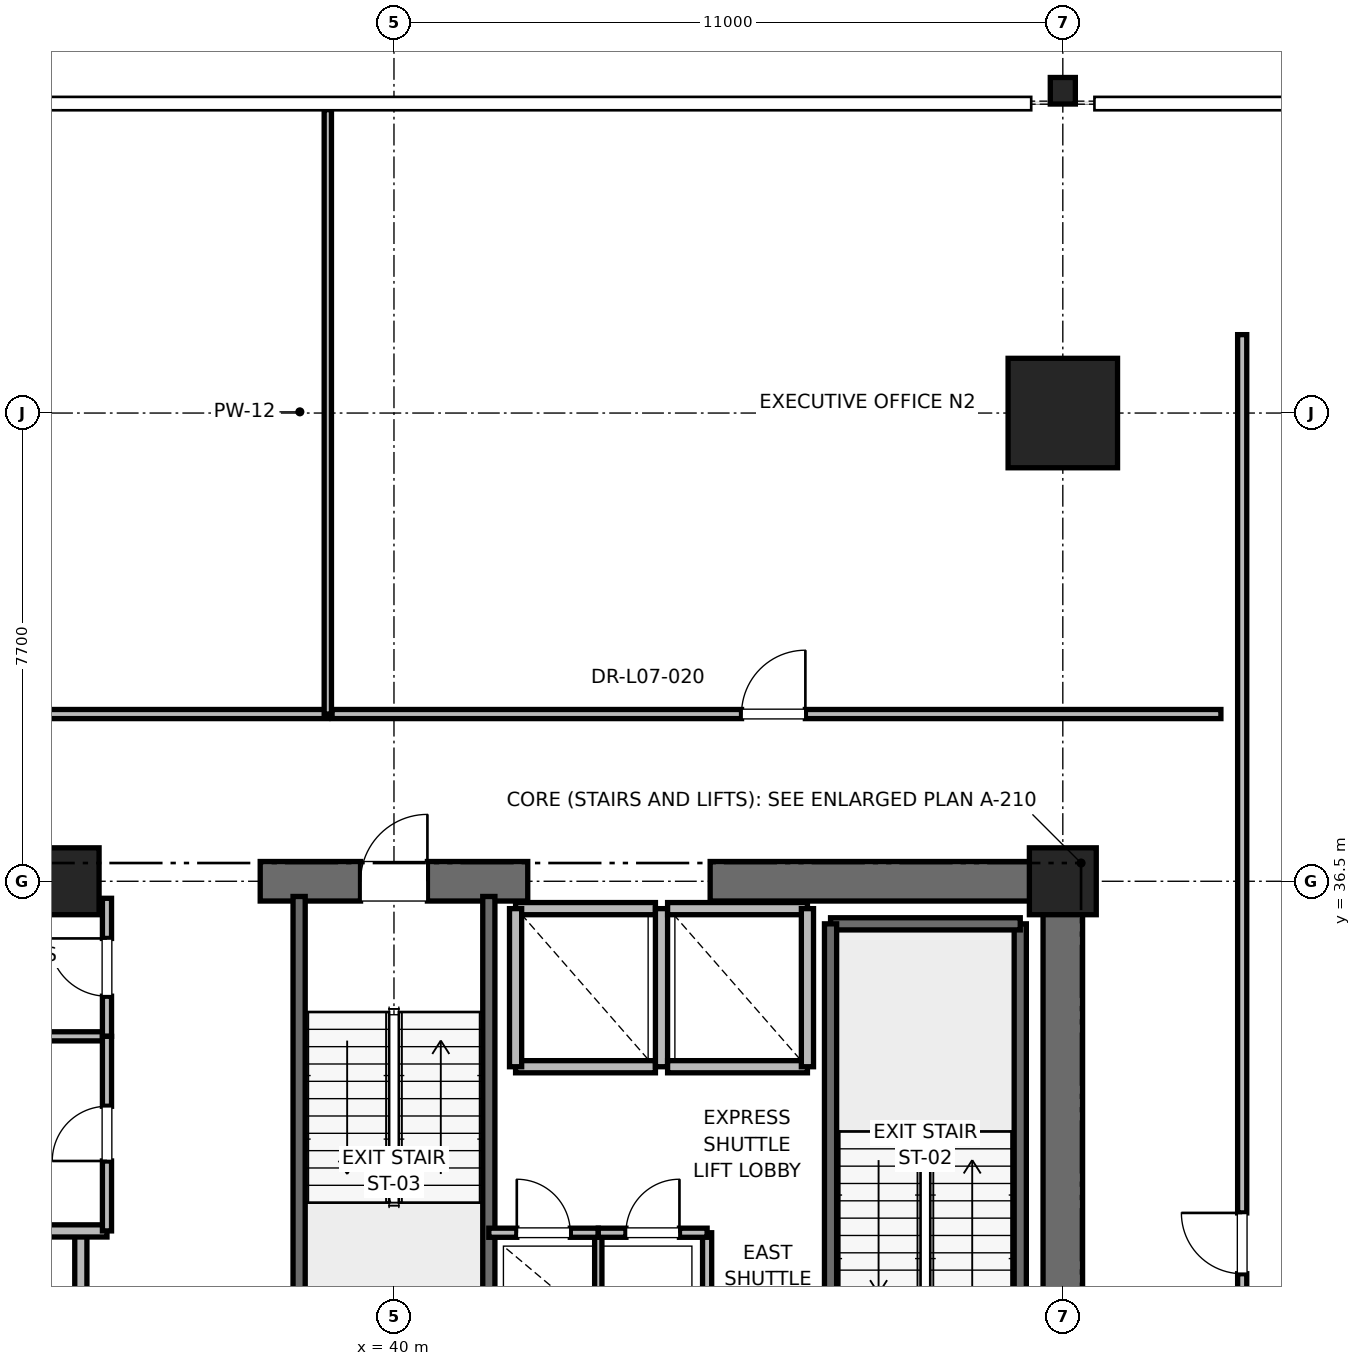
"""IFC4 building model, lengths in metres.
Left out: names, types, materials, properties, quantities, classifications, styles, units other than length and angle.
Written with IfcOpenShell. Run it as: python <this file> out.ifc"""

import sys

from ifc_helpers import new_model, si_unit, direction, frame, frame_2d, origin, origin_2d, place, context, subcontext, project, spatial, rectangle, i_section, extrude, element, fill, save


model = new_model("IFC4")
c1 = context("Model", 3, precision=1e-05, world=origin(), true_north=direction((0.0, 1.0)))
c2 = subcontext(c1, "Body", "Model", "MODEL_VIEW")
j1 = project(units=[si_unit("LENGTHUNIT", "METRE"), si_unit("PLANEANGLEUNIT", "RADIAN")], contexts=[c1])
p1 = place(None, origin())
s1 = spatial("IfcSite", under=j1, at=p1, CompositionType="ELEMENT")
p2 = place(p1, origin())
s2 = spatial("IfcBuilding", under=s1, at=p2, CompositionType="ELEMENT")
p3 = place(p2, frame((0.0, 0.0, 35.6)))
s3 = spatial("IfcBuildingStorey", under=s2, at=p3, CompositionType="ELEMENT", Elevation=35.6)
p4 = place(p3, frame((51.0, 44.2, 0.0), z_axis=(0.0, 0.0, 1.0), x_axis=(1.0, 0.0, 0.0)))
e1 = element("IfcColumn", 1, at=p4, inside=s3, PredefinedType="COLUMN", context=c2, shape_type="SweptSolid", body=[
    extrude(rectangle(XDim=1.8, YDim=1.8, at=origin_2d()), origin(), (0.0, 0.0, 1.0), 4.0),
])
p5 = place(p3, frame((51.0, 49.5, 0.0), z_axis=(0.0, 0.0, 1.0), x_axis=(1.0, 0.0, 0.0)))
e2 = element("IfcColumn", 2, at=p5, inside=s3, PredefinedType="COLUMN", context=c2, shape_type="SweptSolid", body=[
    extrude(i_section(OverallWidth=0.412, OverallDepth=0.437, WebThickness=0.036, FlangeThickness=0.058, FilletRadius=0.015, at=origin_2d()), origin(), (0.0, 0.0, 1.0), 4.0),
])
for number, where, z_axis, x_axis in (
    (3, (51.0, 36.5, 0.0), (0.0, 0.0, 1.0), (1.0, 0.0, 0.0)),
    (4, (34.6, 36.5, 0.0), (0.0, 0.0, 1.0), (1.0, 0.0, 0.0)),
):
    element("IfcColumn", number, at=place(p3, frame(where, z_axis=z_axis, x_axis=x_axis)), inside=s3, PredefinedType="PILASTER", context=c2, shape_type="SweptSolid", body=[
        extrude(rectangle(XDim=1.1, YDim=1.1, at=origin_2d()), origin(), (0.0, 0.0, 1.0), 4.0),
    ])
p6 = place(p3, frame((29.0, 36.5, 0.0), z_axis=(0.0, 0.0, 1.0), x_axis=(1.0, 0.0, 0.0)))
e5 = element("IfcWall", 5, at=p6, inside=s3, PredefinedType="SHEAR", context=c2, shape_type="SweptSolid", body=[
    extrude(rectangle(XDim=5.8, YDim=0.65, at=frame_2d((2.9, 0.0))), origin(), (0.0, 0.0, 1.0), 3.76),
])
p7 = place(p3, frame((37.8, 36.5, 0.0), z_axis=(0.0, 0.0, 1.0), x_axis=(1.0, 0.0, 0.0)))
e6 = element("IfcWall", 6, at=p7, inside=s3, PredefinedType="SHEAR", context=c2, shape_type="SweptSolid", body=[
    extrude(rectangle(XDim=4.4, YDim=0.65, at=frame_2d((2.2, 0.0))), origin(), (0.0, 0.0, 1.0), 3.76),
])
p8 = place(p7, frame((1.65, 0.0, 0.0)))
e7 = element("IfcOpeningElement", 7, at=p8, cuts=e6, PredefinedType="OPENING", context=c2, shape_type="SweptSolid", body=[
    extrude(rectangle(XDim=1.1, YDim=2.15, at=frame_2d((0.55, 1.075))), frame((0.0, 0.325, 0.0), z_axis=(0.0, -1.0, 0.0), x_axis=(1.0, 0.0, 0.0)), (0.0, 0.0, 1.0), 0.65),
])
p9 = place(p3, frame((45.2, 36.5, 0.0), z_axis=(0.0, 0.0, 1.0), x_axis=(1.0, 0.0, 0.0)))
e8 = element("IfcWall", 8, at=p9, inside=s3, PredefinedType="SHEAR", context=c2, shape_type="SweptSolid", body=[
    extrude(rectangle(XDim=5.8, YDim=0.65, at=frame_2d((2.9, 0.0))), origin(), (0.0, 0.0, 1.0), 3.76),
])
p10 = place(p3, frame((51.0, 27.7, 0.0), z_axis=(0.0, 0.0, 1.0), x_axis=(0.0, 1.0, 0.0)))
e9 = element("IfcWall", 9, at=p10, inside=s3, PredefinedType="SHEAR", context=c2, shape_type="SweptSolid", body=[
    extrude(rectangle(XDim=8.8, YDim=0.65, at=frame_2d((4.4, 0.0))), origin(), (0.0, 0.0, 1.0), 3.76),
])
p11 = place(p3, frame((50.3, 27.65, 0.0), z_axis=(0.0, 0.0, 1.0), x_axis=(0.0, 1.0, 0.0)))
e10 = element("IfcWall", 10, at=p11, inside=s3, PredefinedType="SOLIDWALL", context=c2, shape_type="SweptSolid", body=[
    extrude(rectangle(XDim=8.15, YDim=0.2, at=frame_2d((4.075, 0.0))), origin(), (0.0, 0.0, 1.0), 3.76),
])
p12 = place(p3, frame((47.18, 35.8, 0.0), z_axis=(0.0, 0.0, 1.0), x_axis=(1.0, 0.0, 0.0)))
e11 = element("IfcWall", 11, at=p12, inside=s3, PredefinedType="SOLIDWALL", context=c2, shape_type="SweptSolid", body=[
    extrude(rectangle(XDim=3.12, YDim=0.2, at=frame_2d((1.56, 0.0))), origin(), (0.0, 0.0, 1.0), 3.76),
])
p13 = place(p3, frame((47.18, 27.62, 0.0), z_axis=(0.0, 0.0, 1.0), x_axis=(0.0, 1.0, 0.0)))
e12 = element("IfcWall", 12, at=p13, inside=s3, PredefinedType="SOLIDWALL", context=c2, shape_type="SweptSolid", body=[
    extrude(rectangle(XDim=8.18, YDim=0.2, at=frame_2d((4.09, 0.0))), origin(), (0.0, 0.0, 1.0), 3.76),
])
p14 = place(p3, frame((38.44, 27.38, 0.0), z_axis=(0.0, 0.0, 1.0), x_axis=(0.0, 1.0, 0.0)))
e13 = element("IfcWall", 13, at=p14, inside=s3, PredefinedType="SOLIDWALL", context=c2, shape_type="SweptSolid", body=[
    extrude(rectangle(XDim=8.87, YDim=0.2, at=frame_2d((4.435, 0.0))), origin(), (0.0, 0.0, 1.0), 3.76),
])
p15 = place(p3, frame((41.56, 27.68, 0.0), z_axis=(0.0, 0.0, 1.0), x_axis=(0.0, 1.0, 0.0)))
e14 = element("IfcWall", 14, at=p15, inside=s3, PredefinedType="SOLIDWALL", context=c2, shape_type="SweptSolid", body=[
    extrude(rectangle(XDim=8.57, YDim=0.2, at=frame_2d((4.285, 0.0))), origin(), (0.0, 0.0, 1.0), 3.76),
])
p16 = place(p3, frame((34.85, 27.38, 0.0), z_axis=(0.0, 0.0, 1.0), x_axis=(0.0, 1.0, 0.0)))
e15 = element("IfcWall", 15, at=p16, inside=s3, PredefinedType="PARTITIONING", context=c2, shape_type="SweptSolid", body=[
    extrude(rectangle(XDim=3.37, YDim=0.2, at=frame_2d((1.685, 0.0))), origin(), (0.0, 0.0, 1.0), 3.76),
])
p17 = place(p16, frame((1.11, 0.0, 0.0)))
e16 = element("IfcOpeningElement", 16, at=p17, cuts=e15, PredefinedType="OPENING", context=c2, shape_type="SweptSolid", body=[
    extrude(rectangle(XDim=1.15, YDim=2.2, at=frame_2d((0.575, 1.1))), frame((0.0, 0.1, 0.0), z_axis=(0.0, -1.0, 0.0), x_axis=(1.0, 0.0, 0.0)), (0.0, 0.0, 1.0), 0.2),
])
p18 = place(p3, frame((32.15, 30.75, 0.0), z_axis=(0.0, 0.0, 1.0), x_axis=(1.0, 0.0, 0.0)))
e17 = element("IfcWall", 17, at=p18, inside=s3, PredefinedType="PARTITIONING", context=c2, shape_type="SweptSolid", body=[
    extrude(rectangle(XDim=3.13, YDim=0.2, at=frame_2d((1.565, 0.0))), origin(), (0.0, 0.0, 1.0), 3.76),
])
p19 = place(p3, frame((42.0, 33.45, 0.0), z_axis=(0.0, 0.0, 1.0), x_axis=(1.0, 0.0, 0.0)))
e18 = element("IfcWall", 18, at=p19, inside=s3, PredefinedType="SOLIDWALL", context=c2, shape_type="SweptSolid", body=[
    extrude(rectangle(XDim=2.3, YDim=0.2, at=frame_2d((1.15, 0.0))), origin(), (0.0, 0.0, 1.0), 3.76),
])
p20 = place(p3, frame((44.3, 36.05, 0.0), z_axis=(0.0, 0.0, 1.0), x_axis=(-1.0, 0.0, 0.0)))
e19 = element("IfcWall", 19, at=p20, inside=s3, PredefinedType="SOLIDWALL", context=c2, shape_type="SweptSolid", body=[
    extrude(rectangle(XDim=2.3, YDim=0.2, at=frame_2d((1.15, 0.0))), origin(), (0.0, 0.0, 1.0), 2.54),
])
for number, where, z_axis, x_axis in (
    (20, (42.0, 36.05, 0.0), (0.0, 0.0, 1.0), (0.0, -1.0, 0.0)),
    (21, (44.4, 33.45, 0.0), (0.0, 0.0, 1.0), (0.0, 1.0, 0.0)),
):
    element("IfcWall", number, at=place(p3, frame(where, z_axis=z_axis, x_axis=x_axis)), inside=s3, PredefinedType="SOLIDWALL", context=c2, shape_type="SweptSolid", body=[
        extrude(rectangle(XDim=2.6, YDim=0.2, at=frame_2d((1.3, 0.0))), origin(), (0.0, 0.0, 1.0), 2.54),
    ])
p21 = place(p3, frame((44.5, 33.45, 0.0), z_axis=(0.0, 0.0, 1.0), x_axis=(1.0, 0.0, 0.0)))
e22 = element("IfcWall", 22, at=p21, inside=s3, PredefinedType="SOLIDWALL", context=c2, shape_type="SweptSolid", body=[
    extrude(rectangle(XDim=2.3, YDim=0.2, at=frame_2d((1.15, 0.0))), origin(), (0.0, 0.0, 1.0), 3.76),
])
p22 = place(p3, frame((46.8, 36.05, 0.0), z_axis=(0.0, 0.0, 1.0), x_axis=(-1.0, 0.0, 0.0)))
e23 = element("IfcWall", 23, at=p22, inside=s3, PredefinedType="SOLIDWALL", context=c2, shape_type="SweptSolid", body=[
    extrude(rectangle(XDim=2.3, YDim=0.2, at=frame_2d((1.15, 0.0))), origin(), (0.0, 0.0, 1.0), 2.54),
])
p23 = place(p3, frame((46.8, 33.45, 0.0), z_axis=(0.0, 0.0, 1.0), x_axis=(0.0, 1.0, 0.0)))
e24 = element("IfcWall", 24, at=p23, inside=s3, PredefinedType="SOLIDWALL", context=c2, shape_type="SweptSolid", body=[
    extrude(rectangle(XDim=2.6, YDim=0.2, at=frame_2d((1.3, 0.0))), origin(), (0.0, 0.0, 1.0), 3.76),
])
p24 = place(p3, frame((32.15, 33.95, 0.0), z_axis=(0.0, 0.0, 1.0), x_axis=(1.0, 0.0, 0.0)))
e25 = element("IfcWall", 25, at=p24, inside=s3, PredefinedType="PARTITIONING", context=c2, shape_type="SweptSolid", body=[
    extrude(rectangle(XDim=3.13, YDim=0.15, at=frame_2d((1.565, 0.0))), origin(), (0.0, 0.0, 1.0), 2.85),
])
p25 = place(p3, frame((35.28, 33.95, 0.0), z_axis=(0.0, 0.0, 1.0), x_axis=(0.0, 1.0, 0.0)))
e26 = element("IfcWall", 26, at=p25, inside=s3, PredefinedType="PARTITIONING", context=c2, shape_type="SweptSolid", body=[
    extrude(rectangle(XDim=2.27, YDim=0.15, at=frame_2d((1.135, 0.0))), origin(), (0.0, 0.0, 1.0), 2.54),
])
p26 = place(p25, frame((0.66, 0.0, 0.0)))
e27 = element("IfcOpeningElement", 27, at=p26, cuts=e26, PredefinedType="OPENING", context=c2, shape_type="SweptSolid", body=[
    extrude(rectangle(XDim=0.95, YDim=2.15, at=frame_2d((0.475, 1.075))), frame((0.0, 0.075, 0.0), z_axis=(0.0, -1.0, 0.0), x_axis=(1.0, 0.0, 0.0)), (0.0, 0.0, 1.0), 0.15),
])
p27 = place(p3, frame((35.28, 30.75, 0.0), z_axis=(0.0, 0.0, 1.0), x_axis=(0.0, 1.0, 0.0)))
e28 = element("IfcWall", 28, at=p27, inside=s3, PredefinedType="PARTITIONING", context=c2, shape_type="SweptSolid", body=[
    extrude(rectangle(XDim=3.2, YDim=0.15, at=frame_2d((1.6, 0.0))), origin(), (0.0, 0.0, 1.0), 2.85),
])
p28 = place(p27, frame((1.15, 0.0, 0.0)))
e29 = element("IfcOpeningElement", 29, at=p28, cuts=e28, PredefinedType="OPENING", context=c2, shape_type="SweptSolid", body=[
    extrude(rectangle(XDim=0.9, YDim=2.1, at=frame_2d((0.45, 1.05))), frame((0.0, 0.075, 0.0), z_axis=(0.0, -1.0, 0.0), x_axis=(1.0, 0.0, 0.0)), (0.0, 0.0, 1.0), 0.15),
])
p29 = place(p3, frame((45.15, 27.62, 0.0), z_axis=(0.0, 0.0, 1.0), x_axis=(0.0, 1.0, 0.0)))
e30 = element("IfcWall", 30, at=p29, inside=s3, PredefinedType="PARTITIONING", context=c2, shape_type="SweptSolid", body=[
    extrude(rectangle(XDim=3.1, YDim=0.15, at=frame_2d((1.55, 0.0))), origin(), (0.0, 0.0, 1.0), 2.85),
])
p30 = place(p3, frame((43.36, 27.68, 0.0), z_axis=(0.0, 0.0, 1.0), x_axis=(0.0, 1.0, 0.0)))
e31 = element("IfcWall", 31, at=p30, inside=s3, PredefinedType="PARTITIONING", context=c2, shape_type="SweptSolid", body=[
    extrude(rectangle(XDim=3.04, YDim=0.12, at=frame_2d((1.52, 0.0))), origin(), (0.0, 0.0, 1.0), 2.85),
])
p31 = place(p3, frame((41.56, 30.72, 0.0), z_axis=(0.0, 0.0, 1.0), x_axis=(1.0, 0.0, 0.0)))
e32 = element("IfcWall", 32, at=p31, inside=s3, PredefinedType="PARTITIONING", context=c2, shape_type="SweptSolid", body=[
    extrude(rectangle(XDim=1.8, YDim=0.15, at=frame_2d((0.9, 0.0))), origin(), (0.0, 0.0, 1.0), 2.85),
])
p32 = place(p31, frame((0.46, 0.0, 0.0)))
e33 = element("IfcOpeningElement", 33, at=p32, cuts=e32, PredefinedType="OPENING", context=c2, shape_type="SweptSolid", body=[
    extrude(rectangle(XDim=0.88, YDim=2.1, at=frame_2d((0.44, 1.05))), frame((0.0, 0.075, 0.0), z_axis=(0.0, -1.0, 0.0), x_axis=(1.0, 0.0, 0.0)), (0.0, 0.0, 1.0), 0.15),
])
p33 = place(p3, frame((43.36, 30.72, 0.0), z_axis=(0.0, 0.0, 1.0), x_axis=(1.0, 0.0, 0.0)))
e34 = element("IfcWall", 34, at=p33, inside=s3, PredefinedType="PARTITIONING", context=c2, shape_type="SweptSolid", body=[
    extrude(rectangle(XDim=1.79, YDim=0.15, at=frame_2d((0.895, 0.0))), origin(), (0.0, 0.0, 1.0), 2.85),
])
p34 = place(p33, frame((0.455, 0.0, 0.0)))
e35 = element("IfcOpeningElement", 35, at=p34, cuts=e34, PredefinedType="OPENING", context=c2, shape_type="SweptSolid", body=[
    extrude(rectangle(XDim=0.88, YDim=2.1, at=frame_2d((0.44, 1.05))), frame((0.0, 0.075, 0.0), z_axis=(0.0, -1.0, 0.0), x_axis=(1.0, 0.0, 0.0)), (0.0, 0.0, 1.0), 0.15),
])
p35 = place(p3, frame((26.4, 39.25, 0.0), z_axis=(0.0, 0.0, 1.0), x_axis=(1.0, 0.0, 0.0)))
e36 = element("IfcWall", 36, at=p35, inside=s3, PredefinedType="PARTITIONING", context=c2, shape_type="SweptSolid", body=[
    extrude(rectangle(XDim=12.512, YDim=0.15, at=frame_2d((6.256, 0.0))), origin(), (0.0, 0.0, 1.0), 2.85),
])
p36 = place(p35, frame((5.771, 0.0, 0.0)))
e37 = element("IfcOpeningElement", 37, at=p36, cuts=e36, PredefinedType="OPENING", context=c2, shape_type="SweptSolid", body=[
    extrude(rectangle(XDim=1.0, YDim=2.15, at=frame_2d((0.5, 1.075))), frame((0.0, 0.075, 0.0), z_axis=(0.0, -1.0, 0.0), x_axis=(1.0, 0.0, 0.0)), (0.0, 0.0, 1.0), 0.15),
])
p37 = place(p3, frame((38.912, 39.25, 0.0), z_axis=(0.0, 0.0, 1.0), x_axis=(0.0, 1.0, 0.0)))
e38 = element("IfcWall", 38, at=p37, inside=s3, PredefinedType="PARTITIONING", context=c2, shape_type="SweptSolid", body=[
    extrude(rectangle(XDim=9.939, YDim=0.12, at=frame_2d((4.97, 0.0))), origin(), (0.0, 0.0, 1.0), 2.39),
])
p38 = place(p3, frame((38.982, 39.25, 0.0), z_axis=(0.0, 0.0, 1.0), x_axis=(1.0, 0.0, 0.0)))
e39 = element("IfcWall", 39, at=p38, inside=s3, PredefinedType="PARTITIONING", context=c2, shape_type="SweptSolid", body=[
    extrude(rectangle(XDim=14.618, YDim=0.15, at=frame_2d((7.309, 0.0))), origin(), (0.0, 0.0, 1.0), 2.85),
])
p39 = place(p38, frame((6.734, 0.0, 0.0)))
e40 = element("IfcOpeningElement", 40, at=p39, cuts=e39, PredefinedType="OPENING", context=c2, shape_type="SweptSolid", body=[
    extrude(rectangle(XDim=1.05, YDim=2.2, at=frame_2d((0.525, 1.1))), frame((0.0, 0.075, 0.0), z_axis=(0.0, -1.0, 0.0), x_axis=(1.0, 0.0, 0.0)), (0.0, 0.0, 1.0), 0.15),
])
p40 = place(p3, frame((53.95, 24.692, 0.0), z_axis=(0.0, 0.0, 1.0), x_axis=(0.0, 1.0, 0.0)))
e41 = element("IfcWall", 41, at=p40, inside=s3, PredefinedType="PARTITIONING", context=c2, shape_type="SweptSolid", body=[
    extrude(rectangle(XDim=20.798, YDim=0.15, at=frame_2d((10.399, 0.0))), origin(), (0.0, 0.0, 1.0), 2.85),
])
p41 = place(p40, frame((5.354, 0.0, 0.0)))
e42 = element("IfcOpeningElement", 42, at=p41, cuts=e41, PredefinedType="OPENING", context=c2, shape_type="SweptSolid", body=[
    extrude(rectangle(XDim=1.0, YDim=2.15, at=frame_2d((0.5, 1.075))), frame((0.0, 0.075, 0.0), z_axis=(0.0, -1.0, 0.0), x_axis=(1.0, 0.0, 0.0)), (0.0, 0.0, 1.0), 0.15),
])
p42 = place(p8, origin())
e43 = element("IfcDoor", 43, at=p42, inside=s3, OperationType="SINGLE_SWING_RIGHT", PredefinedType="DOOR", context=c2, shape_type="SweptSolid", body=[
    extrude(rectangle(XDim=1.1, YDim=2.15, at=frame_2d((0.55, 1.075))), frame((0.0, 0.025, 0.0), z_axis=(0.0, -1.0, 0.0), x_axis=(1.0, 0.0, 0.0)), (0.0, 0.0, 1.0), 0.05),
])
fill(e7, e43)
p43 = place(p26, origin())
e44 = element("IfcDoor", 44, at=p43, inside=s3, OperationType="SINGLE_SWING_RIGHT", PredefinedType="DOOR", context=c2, shape_type="SweptSolid", body=[
    extrude(rectangle(XDim=0.95, YDim=2.15, at=frame_2d((0.475, 1.075))), frame((0.0, 0.025, 0.0), z_axis=(0.0, -1.0, 0.0), x_axis=(1.0, 0.0, 0.0)), (0.0, 0.0, 1.0), 0.05),
])
fill(e27, e44)
p44 = place(p28, origin())
e45 = element("IfcDoor", 45, at=p44, inside=s3, OperationType="SINGLE_SWING_LEFT", PredefinedType="DOOR", context=c2, shape_type="SweptSolid", body=[
    extrude(rectangle(XDim=0.9, YDim=2.1, at=frame_2d((0.45, 1.05))), frame((0.0, 0.025, 0.0), z_axis=(0.0, -1.0, 0.0), x_axis=(1.0, 0.0, 0.0)), (0.0, 0.0, 1.0), 0.05),
])
fill(e29, e45)
p45 = place(p32, origin())
e46 = element("IfcDoor", 46, at=p45, inside=s3, OperationType="SINGLE_SWING_LEFT", PredefinedType="DOOR", context=c2, shape_type="SweptSolid", body=[
    extrude(rectangle(XDim=0.88, YDim=2.1, at=frame_2d((0.44, 1.05))), frame((0.0, 0.025, 0.0), z_axis=(0.0, -1.0, 0.0), x_axis=(1.0, 0.0, 0.0)), (0.0, 0.0, 1.0), 0.05),
])
fill(e33, e46)
p46 = place(p34, origin())
e47 = element("IfcDoor", 47, at=p46, inside=s3, OperationType="SINGLE_SWING_RIGHT", PredefinedType="DOOR", context=c2, shape_type="SweptSolid", body=[
    extrude(rectangle(XDim=0.88, YDim=2.1, at=frame_2d((0.44, 1.05))), frame((0.0, 0.025, 0.0), z_axis=(0.0, -1.0, 0.0), x_axis=(1.0, 0.0, 0.0)), (0.0, 0.0, 1.0), 0.05),
])
fill(e35, e47)
p47 = place(p39, origin())
e48 = element("IfcDoor", 48, at=p47, inside=s3, OperationType="SINGLE_SWING_RIGHT", PredefinedType="DOOR", context=c2, shape_type="SweptSolid", body=[
    extrude(rectangle(XDim=1.05, YDim=2.2, at=frame_2d((0.525, 1.1))), frame((0.0, 0.025, 0.0), z_axis=(0.0, -1.0, 0.0), x_axis=(1.0, 0.0, 0.0)), (0.0, 0.0, 1.0), 0.05),
])
fill(e40, e48)
p48 = place(p41, origin())
e49 = element("IfcDoor", 49, at=p48, inside=s3, OperationType="SINGLE_SWING_RIGHT", PredefinedType="DOOR", context=c2, shape_type="SweptSolid", body=[
    extrude(rectangle(XDim=1.0, YDim=2.15, at=frame_2d((0.5, 1.075))), frame((0.0, 0.025, 0.0), z_axis=(0.0, -1.0, 0.0), x_axis=(1.0, 0.0, 0.0)), (0.0, 0.0, 1.0), 0.05),
])
fill(e42, e49)
save(model, sys.argv[1])
